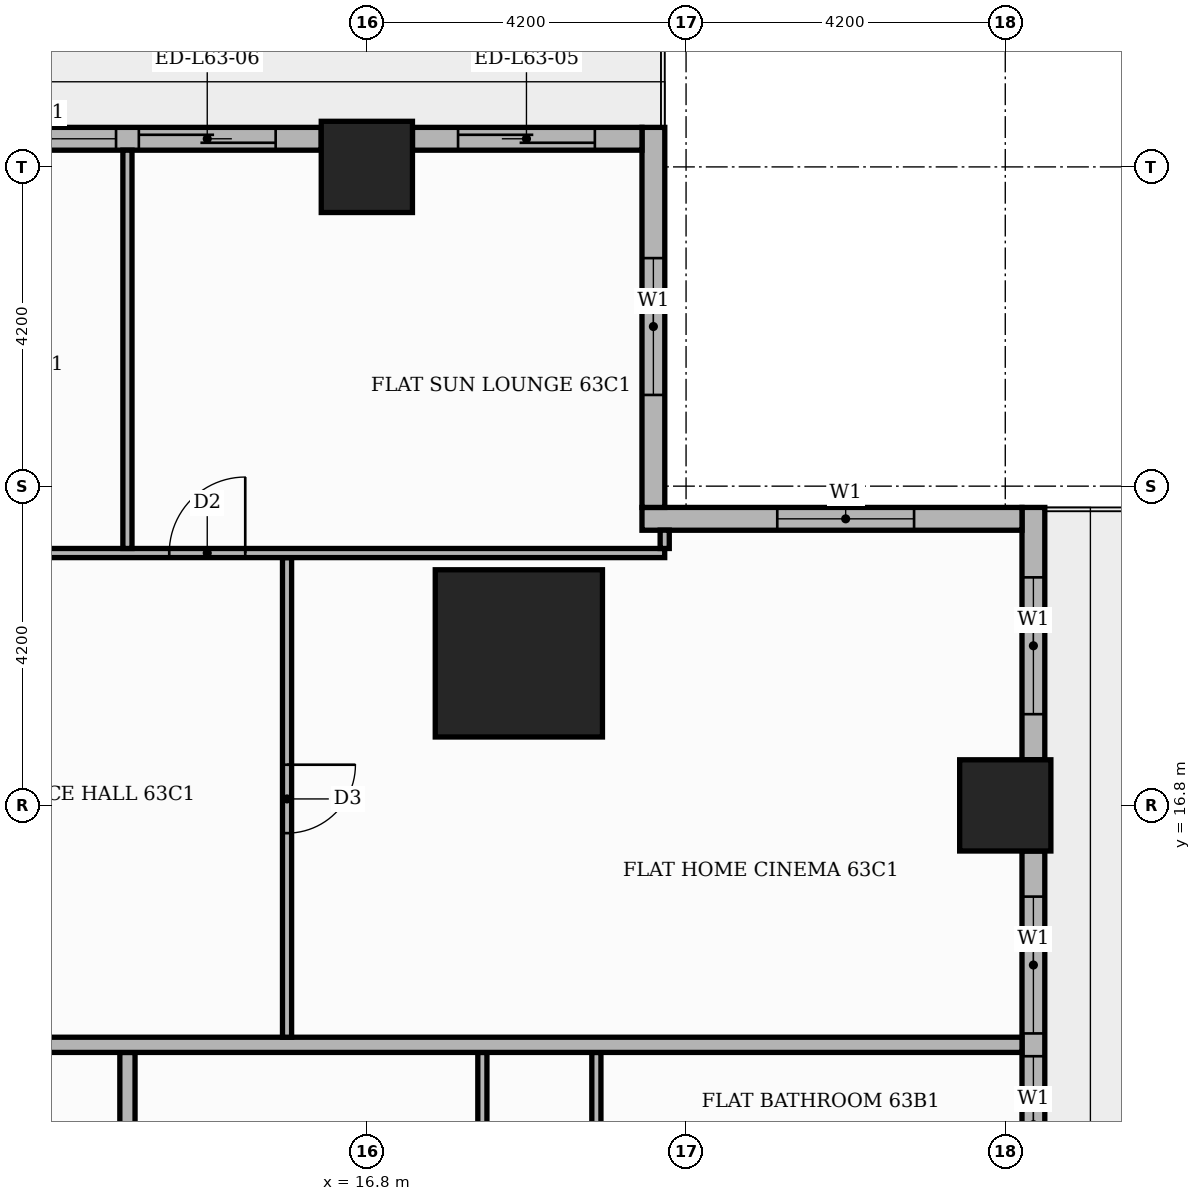
"""IFC4 building model, lengths in metres.
Left out: names, types, materials, properties, quantities, classifications, styles, units other than length and angle.
Written with IfcOpenShell. Run it as: python <this file> out.ifc"""

import sys

from ifc_helpers import new_model, si_unit, direction, frame, frame_2d, origin, origin_2d, place, context, subcontext, project, spatial, rectangle, extrude, element, fill, save


model = new_model("IFC4")
c1 = context("Model", 3, precision=1e-05, world=origin(), true_north=direction((0.0, 1.0)))
c2 = subcontext(c1, "Body", "Model", "MODEL_VIEW")
j1 = project(units=[si_unit("LENGTHUNIT", "METRE"), si_unit("PLANEANGLEUNIT", "RADIAN")], contexts=[c1])
p1 = place(None, origin())
s1 = spatial("IfcSite", under=j1, at=p1, CompositionType="ELEMENT")
p2 = place(p1, origin())
s2 = spatial("IfcBuilding", under=s1, at=p2, CompositionType="ELEMENT")
p3 = place(p2, frame((0.0, 0.0, 264.0)))
s3 = spatial("IfcBuildingStorey", under=s2, at=p3, CompositionType="ELEMENT", Elevation=264.0)
p4 = place(p3, frame((18.8, 18.8, 0.0), z_axis=(0.0, 0.0, 1.0), x_axis=(1.0, 0.0, 0.0)))
e1 = element("IfcColumn", 1, at=p4, inside=s3, PredefinedType="COLUMN", context=c2, shape_type="SweptSolid", body=[
    extrude(rectangle(XDim=2.2, YDim=2.2, at=origin_2d()), origin(), (0.0, 0.0, 1.0), 3.9),
])
for number, where, z_axis, x_axis in (
    (2, (25.2, 16.8, 0.0), (0.0, 0.0, 1.0), (1.0, 0.0, 0.0)),
    (3, (16.8, 25.2, 0.0), (0.0, 0.0, 1.0), (1.0, 0.0, 0.0)),
):
    element("IfcColumn", number, at=place(p3, frame(where, z_axis=z_axis, x_axis=x_axis)), inside=s3, PredefinedType="COLUMN", context=c2, shape_type="SweptSolid", body=[
        extrude(rectangle(XDim=1.2, YDim=1.2, at=origin_2d()), origin(), (0.0, 0.0, 1.0), 3.9),
    ])
p5 = place(p3, frame((25.57, 9.0, 0.0), z_axis=(0.0, 0.0, 1.0), x_axis=(0.0, 1.0, 0.0)))
e4 = element("IfcWall", 4, at=p5, inside=s3, PredefinedType="STANDARD", context=c2, shape_type="SweptSolid", body=[
    extrude(rectangle(XDim=7.2, YDim=0.3, at=frame_2d((3.6, 0.0))), origin(), (0.0, 0.0, 1.0), 3.48),
])
p6 = place(p5, frame((0.6, 0.0, 0.9)))
e5 = element("IfcOpeningElement", 5, at=p6, cuts=e4, PredefinedType="OPENING", context=c2, shape_type="SweptSolid", body=[
    extrude(rectangle(XDim=1.8, YDim=2.1, at=frame_2d((0.9, 1.05))), frame((0.0, 0.16, 0.0), z_axis=(0.0, -1.0, 0.0), x_axis=(1.0, 0.0, 0.0)), (0.0, 0.0, 1.0), 0.32),
])
p7 = place(p5, frame((2.7, 0.0, 0.9)))
e6 = element("IfcOpeningElement", 6, at=p7, cuts=e4, PredefinedType="OPENING", context=c2, shape_type="SweptSolid", body=[
    extrude(rectangle(XDim=1.8, YDim=2.1, at=frame_2d((0.9, 1.05))), frame((0.0, 0.16, 0.0), z_axis=(0.0, -1.0, 0.0), x_axis=(1.0, 0.0, 0.0)), (0.0, 0.0, 1.0), 0.32),
])
p8 = place(p5, frame((4.8, 0.0, 0.9)))
e7 = element("IfcOpeningElement", 7, at=p8, cuts=e4, PredefinedType="OPENING", context=c2, shape_type="SweptSolid", body=[
    extrude(rectangle(XDim=1.8, YDim=2.1, at=frame_2d((0.9, 1.05))), frame((0.0, 0.16, 0.0), z_axis=(0.0, -1.0, 0.0), x_axis=(1.0, 0.0, 0.0)), (0.0, 0.0, 1.0), 0.32),
])
p9 = place(p3, frame((25.57, 17.4, 0.0), z_axis=(0.0, 0.0, 1.0), x_axis=(0.0, 1.0, 0.0)))
e8 = element("IfcWall", 8, at=p9, inside=s3, PredefinedType="STANDARD", context=c2, shape_type="SweptSolid", body=[
    extrude(rectangle(XDim=3.32, YDim=0.3, at=frame_2d((1.66, 0.0))), origin(), (0.0, 0.0, 1.0), 3.48),
])
p10 = place(p9, frame((0.6, 0.0, 0.9)))
e9 = element("IfcOpeningElement", 9, at=p10, cuts=e8, PredefinedType="OPENING", context=c2, shape_type="SweptSolid", body=[
    extrude(rectangle(XDim=1.8, YDim=2.1, at=frame_2d((0.9, 1.05))), frame((0.0, 0.16, 0.0), z_axis=(0.0, -1.0, 0.0), x_axis=(1.0, 0.0, 0.0)), (0.0, 0.0, 1.0), 0.32),
])
p11 = place(p3, frame((25.42, 20.57, 0.0), z_axis=(0.0, 0.0, 1.0), x_axis=(-1.0, 0.0, 0.0)))
e10 = element("IfcWall", 10, at=p11, inside=s3, PredefinedType="STANDARD", context=c2, shape_type="SweptSolid", body=[
    extrude(rectangle(XDim=5.0, YDim=0.3, at=frame_2d((2.5, 0.0))), origin(), (0.0, 0.0, 1.0), 3.48),
])
p12 = place(p11, frame((1.42, 0.0, 0.9)))
e11 = element("IfcOpeningElement", 11, at=p12, cuts=e10, PredefinedType="OPENING", context=c2, shape_type="SweptSolid", body=[
    extrude(rectangle(XDim=1.8, YDim=2.1, at=frame_2d((0.9, 1.05))), frame((0.0, 0.16, 0.0), z_axis=(0.0, -1.0, 0.0), x_axis=(1.0, 0.0, 0.0)), (0.0, 0.0, 1.0), 0.32),
])
p13 = place(p3, frame((20.57, 20.72, 0.0), z_axis=(0.0, 0.0, 1.0), x_axis=(0.0, 1.0, 0.0)))
e12 = element("IfcWall", 12, at=p13, inside=s3, PredefinedType="STANDARD", context=c2, shape_type="SweptSolid", body=[
    extrude(rectangle(XDim=5.0, YDim=0.3, at=frame_2d((2.5, 0.0))), origin(), (0.0, 0.0, 1.0), 3.48),
])
p14 = place(p13, frame((1.48, 0.0, 0.9)))
e13 = element("IfcOpeningElement", 13, at=p14, cuts=e12, PredefinedType="OPENING", context=c2, shape_type="SweptSolid", body=[
    extrude(rectangle(XDim=1.8, YDim=2.1, at=frame_2d((0.9, 1.05))), frame((0.0, 0.16, 0.0), z_axis=(0.0, -1.0, 0.0), x_axis=(1.0, 0.0, 0.0)), (0.0, 0.0, 1.0), 0.32),
])
p15 = place(p3, frame((20.42, 25.57, 0.0), z_axis=(0.0, 0.0, 1.0), x_axis=(-1.0, 0.0, 0.0)))
e14 = element("IfcWall", 14, at=p15, inside=s3, PredefinedType="STANDARD", context=c2, shape_type="SweptSolid", body=[
    extrude(rectangle(XDim=3.02, YDim=0.3, at=frame_2d((1.51, 0.0))), origin(), (0.0, 0.0, 1.0), 3.48),
])
p16 = place(p15, frame((0.62, 0.0, 0.0)))
e15 = element("IfcOpeningElement", 15, at=p16, cuts=e14, PredefinedType="OPENING", context=c2, shape_type="SweptSolid", body=[
    extrude(rectangle(XDim=1.8, YDim=2.4, at=frame_2d((0.9, 1.2))), frame((0.0, 0.16, 0.0), z_axis=(0.0, -1.0, 0.0), x_axis=(1.0, 0.0, 0.0)), (0.0, 0.0, 1.0), 0.32),
])
p17 = place(p3, frame((16.2, 25.57, 0.0), z_axis=(0.0, 0.0, 1.0), x_axis=(-1.0, 0.0, 0.0)))
e16 = element("IfcWall", 16, at=p17, inside=s3, PredefinedType="STANDARD", context=c2, shape_type="SweptSolid", body=[
    extrude(rectangle(XDim=7.2, YDim=0.3, at=frame_2d((3.6, 0.0))), origin(), (0.0, 0.0, 1.0), 3.48),
])
p18 = place(p17, frame((0.6, 0.0, 0.0)))
e17 = element("IfcOpeningElement", 17, at=p18, cuts=e16, PredefinedType="OPENING", context=c2, shape_type="SweptSolid", body=[
    extrude(rectangle(XDim=1.8, YDim=2.4, at=frame_2d((0.9, 1.2))), frame((0.0, 0.16, 0.0), z_axis=(0.0, -1.0, 0.0), x_axis=(1.0, 0.0, 0.0)), (0.0, 0.0, 1.0), 0.32),
])
p19 = place(p17, frame((2.7, 0.0, 0.9)))
e18 = element("IfcOpeningElement", 18, at=p19, cuts=e16, PredefinedType="OPENING", context=c2, shape_type="SweptSolid", body=[
    extrude(rectangle(XDim=1.8, YDim=2.1, at=frame_2d((0.9, 1.05))), frame((0.0, 0.16, 0.0), z_axis=(0.0, -1.0, 0.0), x_axis=(1.0, 0.0, 0.0)), (0.0, 0.0, 1.0), 0.32),
])
p20 = place(p17, frame((4.8, 0.0, 0.0)))
e19 = element("IfcOpeningElement", 19, at=p20, cuts=e16, PredefinedType="OPENING", context=c2, shape_type="SweptSolid", body=[
    extrude(rectangle(XDim=1.8, YDim=2.4, at=frame_2d((0.9, 1.2))), frame((0.0, 0.16, 0.0), z_axis=(0.0, -1.0, 0.0), x_axis=(1.0, 0.0, 0.0)), (0.0, 0.0, 1.0), 0.32),
])
p21 = place(p3, frame((18.32, 9.66, 0.0), z_axis=(0.0, 0.0, 1.0), x_axis=(0.0, 1.0, 0.0)))
e20 = element("IfcWall", 20, at=p21, inside=s3, PredefinedType="PARTITIONING", context=c2, shape_type="SweptSolid", body=[
    extrude(rectangle(XDim=3.89, YDim=0.12, at=frame_2d((1.945, 0.0))), origin(), (0.0, 0.0, 1.0), 3.48),
])
p22 = place(p21, frame((1.515, 0.0, 0.0)))
e21 = element("IfcOpeningElement", 21, at=p22, cuts=e20, PredefinedType="OPENING", context=c2, shape_type="SweptSolid", body=[
    extrude(rectangle(XDim=0.9, YDim=2.1, at=frame_2d((0.45, 1.05))), frame((0.0, 0.07, 0.0), z_axis=(0.0, -1.0, 0.0), x_axis=(1.0, 0.0, 0.0)), (0.0, 0.0, 1.0), 0.14),
])
p23 = place(p3, frame((13.65, 11.1, 0.0), z_axis=(0.0, 0.0, 1.0), x_axis=(0.0, 1.0, 0.0)))
e22 = element("IfcWall", 22, at=p23, inside=s3, PredefinedType="PARTITIONING", context=c2, shape_type="SweptSolid", body=[
    extrude(rectangle(XDim=2.45, YDim=0.2, at=frame_2d((1.225, 0.0))), origin(), (0.0, 0.0, 1.0), 3.48),
])
p24 = place(p3, frame((19.82, 11.61, 0.0), z_axis=(0.0, 0.0, 1.0), x_axis=(0.0, 1.0, 0.0)))
e23 = element("IfcWall", 23, at=p24, inside=s3, PredefinedType="PARTITIONING", context=c2, shape_type="SweptSolid", body=[
    extrude(rectangle(XDim=1.94, YDim=0.12, at=frame_2d((0.97, 0.0))), origin(), (0.0, 0.0, 1.0), 3.48),
])
p25 = place(p3, frame((-13.65, 13.65, 0.0), z_axis=(0.0, 0.0, 1.0), x_axis=(1.0, 0.0, 0.0)))
e24 = element("IfcWall", 24, at=p25, inside=s3, PredefinedType="PARTITIONING", context=c2, shape_type="SweptSolid", body=[
    extrude(rectangle(XDim=39.07, YDim=0.2, at=frame_2d((19.535, 0.0))), origin(), (0.0, 0.0, 1.0), 3.48),
])
p26 = place(p25, frame((24.65, 0.0, 0.0)))
e25 = element("IfcOpeningElement", 25, at=p26, cuts=e24, PredefinedType="OPENING", context=c2, shape_type="SweptSolid", body=[
    extrude(rectangle(XDim=1.1, YDim=2.4, at=frame_2d((0.55, 1.2))), frame((0.0, 0.11, 0.0), z_axis=(0.0, -1.0, 0.0), x_axis=(1.0, 0.0, 0.0)), (0.0, 0.0, 1.0), 0.22),
])
p27 = place(p3, frame((15.75, 13.75, 0.0), z_axis=(0.0, 0.0, 1.0), x_axis=(0.0, 1.0, 0.0)))
e26 = element("IfcWall", 26, at=p27, inside=s3, PredefinedType="PARTITIONING", context=c2, shape_type="SweptSolid", body=[
    extrude(rectangle(XDim=6.31, YDim=0.12, at=frame_2d((3.155, 0.0))), origin(), (0.0, 0.0, 1.0), 3.48),
])
p28 = place(p27, frame((2.685, 0.0, 0.0)))
e27 = element("IfcOpeningElement", 27, at=p28, cuts=e26, PredefinedType="OPENING", context=c2, shape_type="SweptSolid", body=[
    extrude(rectangle(XDim=0.9, YDim=2.1, at=frame_2d((0.45, 1.05))), frame((0.0, 0.07, 0.0), z_axis=(0.0, -1.0, 0.0), x_axis=(1.0, 0.0, 0.0)), (0.0, 0.0, 1.0), 0.14),
])
p29 = place(p3, frame((-13.55, 20.12, 0.0), z_axis=(0.0, 0.0, 1.0), x_axis=(1.0, 0.0, 0.0)))
e28 = element("IfcWall", 28, at=p29, inside=s3, PredefinedType="PARTITIONING", context=c2, shape_type="SweptSolid", body=[
    extrude(rectangle(XDim=34.269, YDim=0.12, at=frame_2d((17.135, 0.0))), origin(), (0.0, 0.0, 1.0), 3.48),
])
p30 = place(p29, frame((27.75, 0.0, 0.0)))
e29 = element("IfcOpeningElement", 29, at=p30, cuts=e28, PredefinedType="OPENING", context=c2, shape_type="SweptSolid", body=[
    extrude(rectangle(XDim=1.0, YDim=2.1, at=frame_2d((0.5, 1.05))), frame((0.0, 0.07, 0.0), z_axis=(0.0, -1.0, 0.0), x_axis=(1.0, 0.0, 0.0)), (0.0, 0.0, 1.0), 0.14),
])
p31 = place(p29, frame((22.5, 0.0, 0.0)))
e30 = element("IfcOpeningElement", 30, at=p31, cuts=e28, PredefinedType="OPENING", context=c2, shape_type="SweptSolid", body=[
    extrude(rectangle(XDim=1.0, YDim=2.1, at=frame_2d((0.5, 1.05))), frame((0.0, 0.07, 0.0), z_axis=(0.0, -1.0, 0.0), x_axis=(1.0, 0.0, 0.0)), (0.0, 0.0, 1.0), 0.14),
])
p32 = place(p29, frame((14.15, 0.0, 0.0)))
e31 = element("IfcOpeningElement", 31, at=p32, cuts=e28, PredefinedType="OPENING", context=c2, shape_type="SweptSolid", body=[
    extrude(rectangle(XDim=0.9, YDim=2.1, at=frame_2d((0.45, 1.05))), frame((0.0, 0.07, 0.0), z_axis=(0.0, -1.0, 0.0), x_axis=(1.0, 0.0, 0.0)), (0.0, 0.0, 1.0), 0.14),
])
p33 = place(p29, frame((3.65, 0.0, 0.0)))
e32 = element("IfcOpeningElement", 32, at=p33, cuts=e28, PredefinedType="OPENING", context=c2, shape_type="SweptSolid", body=[
    extrude(rectangle(XDim=0.9, YDim=2.1, at=frame_2d((0.45, 1.05))), frame((0.0, 0.07, 0.0), z_axis=(0.0, -1.0, 0.0), x_axis=(1.0, 0.0, 0.0)), (0.0, 0.0, 1.0), 0.14),
])
p34 = place(p3, frame((13.65, 20.18, 0.0), z_axis=(0.0, 0.0, 1.0), x_axis=(0.0, 1.0, 0.0)))
e33 = element("IfcWall", 33, at=p34, inside=s3, PredefinedType="PARTITIONING", context=c2, shape_type="SweptSolid", body=[
    extrude(rectangle(XDim=5.24, YDim=0.12, at=frame_2d((2.62, 0.0))), origin(), (0.0, 0.0, 1.0), 3.48),
])
p35 = place(p3, frame((20.719, 20.18, 0.0), z_axis=(0.0, 0.0, 1.0), x_axis=(0.0, 1.0, 0.0)))
e34 = element("IfcWall", 34, at=p35, inside=s3, PredefinedType="PARTITIONING", context=c2, shape_type="SweptSolid", body=[
    extrude(rectangle(XDim=0.241, YDim=0.12, at=frame_2d((0.121, 0.0))), origin(), (0.0, 0.0, 1.0), 3.48),
])
p36 = place(p7, origin())
e35 = element("IfcWindow", 35, at=p36, inside=s3, PartitioningType="SINGLE_PANEL", PredefinedType="WINDOW", context=c2, shape_type="SweptSolid", body=[
    extrude(rectangle(XDim=1.8, YDim=2.1, at=frame_2d((0.9, 1.05))), frame((0.0, 0.03, 0.0), z_axis=(0.0, -1.0, 0.0), x_axis=(1.0, 0.0, 0.0)), (0.0, 0.0, 1.0), 0.06),
])
fill(e6, e35)
p37 = place(p8, origin())
e36 = element("IfcWindow", 36, at=p37, inside=s3, PartitioningType="SINGLE_PANEL", PredefinedType="WINDOW", context=c2, shape_type="SweptSolid", body=[
    extrude(rectangle(XDim=1.8, YDim=2.1, at=frame_2d((0.9, 1.05))), frame((0.0, 0.03, 0.0), z_axis=(0.0, -1.0, 0.0), x_axis=(1.0, 0.0, 0.0)), (0.0, 0.0, 1.0), 0.06),
])
fill(e7, e36)
p38 = place(p10, origin())
e37 = element("IfcWindow", 37, at=p38, inside=s3, PartitioningType="SINGLE_PANEL", PredefinedType="WINDOW", context=c2, shape_type="SweptSolid", body=[
    extrude(rectangle(XDim=1.8, YDim=2.1, at=frame_2d((0.9, 1.05))), frame((0.0, 0.03, 0.0), z_axis=(0.0, -1.0, 0.0), x_axis=(1.0, 0.0, 0.0)), (0.0, 0.0, 1.0), 0.06),
])
fill(e9, e37)
p39 = place(p12, origin())
e38 = element("IfcWindow", 38, at=p39, inside=s3, PartitioningType="SINGLE_PANEL", PredefinedType="WINDOW", context=c2, shape_type="SweptSolid", body=[
    extrude(rectangle(XDim=1.8, YDim=2.1, at=frame_2d((0.9, 1.05))), frame((0.0, 0.03, 0.0), z_axis=(0.0, -1.0, 0.0), x_axis=(1.0, 0.0, 0.0)), (0.0, 0.0, 1.0), 0.06),
])
fill(e11, e38)
p40 = place(p14, origin())
e39 = element("IfcWindow", 39, at=p40, inside=s3, PartitioningType="SINGLE_PANEL", PredefinedType="WINDOW", context=c2, shape_type="SweptSolid", body=[
    extrude(rectangle(XDim=1.8, YDim=2.1, at=frame_2d((0.9, 1.05))), frame((0.0, 0.03, 0.0), z_axis=(0.0, -1.0, 0.0), x_axis=(1.0, 0.0, 0.0)), (0.0, 0.0, 1.0), 0.06),
])
fill(e13, e39)
p41 = place(p16, origin())
e40 = element("IfcDoor", 40, at=p41, inside=s3, OperationType="SLIDING_TO_RIGHT", PredefinedType="DOOR", context=c2, shape_type="SweptSolid", body=[
    extrude(rectangle(XDim=1.8, YDim=2.4, at=frame_2d((0.9, 1.2))), frame((0.0, 0.025, 0.0), z_axis=(0.0, -1.0, 0.0), x_axis=(1.0, 0.0, 0.0)), (0.0, 0.0, 1.0), 0.05),
])
fill(e15, e40)
p42 = place(p18, origin())
e41 = element("IfcDoor", 41, at=p42, inside=s3, OperationType="SLIDING_TO_LEFT", PredefinedType="DOOR", context=c2, shape_type="SweptSolid", body=[
    extrude(rectangle(XDim=1.8, YDim=2.4, at=frame_2d((0.9, 1.2))), frame((0.0, 0.025, 0.0), z_axis=(0.0, -1.0, 0.0), x_axis=(1.0, 0.0, 0.0)), (0.0, 0.0, 1.0), 0.05),
])
fill(e17, e41)
p43 = place(p19, origin())
e42 = element("IfcWindow", 42, at=p43, inside=s3, PartitioningType="SINGLE_PANEL", PredefinedType="WINDOW", context=c2, shape_type="SweptSolid", body=[
    extrude(rectangle(XDim=1.8, YDim=2.1, at=frame_2d((0.9, 1.05))), frame((0.0, 0.03, 0.0), z_axis=(0.0, -1.0, 0.0), x_axis=(1.0, 0.0, 0.0)), (0.0, 0.0, 1.0), 0.06),
])
fill(e18, e42)
p44 = place(p28, frame((0.9, 0.0, 0.0), z_axis=(0.0, 0.0, 1.0), x_axis=(-1.0, 0.0, 0.0)))
e43 = element("IfcDoor", 43, at=p44, inside=s3, OperationType="SINGLE_SWING_RIGHT", PredefinedType="DOOR", context=c2, shape_type="SweptSolid", body=[
    extrude(rectangle(XDim=0.9, YDim=2.1, at=frame_2d((0.45, 1.05))), frame((0.0, 0.025, 0.0), z_axis=(0.0, -1.0, 0.0), x_axis=(1.0, 0.0, 0.0)), (0.0, 0.0, 1.0), 0.05),
])
fill(e27, e43)
p45 = place(p30, origin())
e44 = element("IfcDoor", 44, at=p45, inside=s3, OperationType="SINGLE_SWING_RIGHT", PredefinedType="DOOR", context=c2, shape_type="SweptSolid", body=[
    extrude(rectangle(XDim=1.0, YDim=2.1, at=frame_2d((0.5, 1.05))), frame((0.0, 0.025, 0.0), z_axis=(0.0, -1.0, 0.0), x_axis=(1.0, 0.0, 0.0)), (0.0, 0.0, 1.0), 0.05),
])
fill(e29, e44)
save(model, sys.argv[1])
